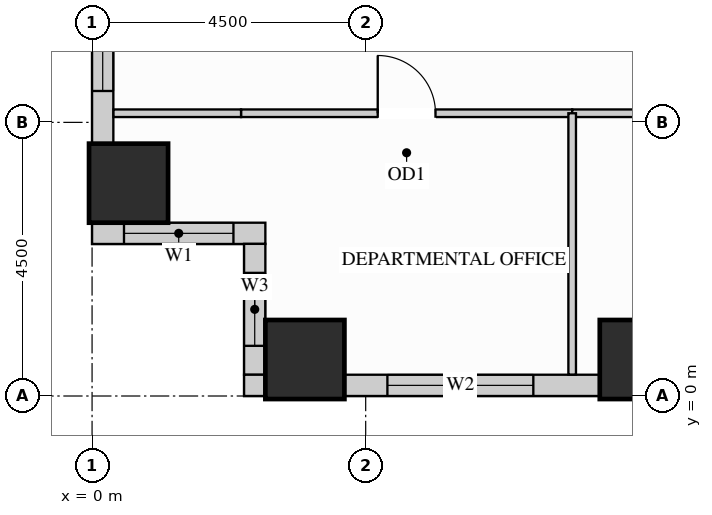
"""IFC4 building model, lengths in metres.
Left out: names, types, materials, properties, quantities, classifications, styles, units other than length and angle.
Written with IfcOpenShell. Run it as: python <this file> out.ifc"""

import sys

from ifc_helpers import new_model, si_unit, direction, frame, frame_2d, origin, origin_2d, place, context, subcontext, project, spatial, rectangle, extrude, source, transform, mapped, element, fill, save


model = new_model("IFC4")
c1 = context("Model", 3, precision=1e-05, world=origin(), true_north=direction((0.0, 1.0)))
c2 = subcontext(c1, "Body", "Model", "MODEL_VIEW")
j1 = project(units=[si_unit("LENGTHUNIT", "METRE"), si_unit("PLANEANGLEUNIT", "RADIAN")], contexts=[c1])
p1 = place(None, origin())
s1 = spatial("IfcSite", under=j1, at=p1, CompositionType="ELEMENT")
p2 = place(p1, origin())
s2 = spatial("IfcBuilding", under=s1, at=p2, CompositionType="ELEMENT")
p3 = place(p2, frame((0.0, 0.0, 22.5)))
s3 = spatial("IfcBuildingStorey", under=s2, at=p3, CompositionType="ELEMENT", Elevation=22.5)
m1 = source(origin(), c2, "Body", "SweptSolid", [
    extrude(rectangle(XDim=1.3, YDim=1.3, at=origin_2d()), origin(), (0.0, 0.0, 1.0), 3.38),
])
for number, where, z_axis, x_axis in (
    (1, (3.5, 0.6, 0.0), (0.0, 0.0, 1.0), (1.0, 0.0, 0.0)),
    (2, (9.0, 0.6, 0.0), (0.0, 0.0, 1.0), (1.0, 0.0, 0.0)),
    (3, (0.6, 3.5, 0.0), (0.0, 0.0, 1.0), (1.0, 0.0, 0.0)),
):
    element("IfcColumn", number, at=place(p3, frame(where, z_axis=z_axis, x_axis=x_axis)), inside=s3, PredefinedType="COLUMN", context=c2, shape_type="MappedRepresentation", body=[
        mapped(m1, transform((0.0, 0.0, 0.0), x_axis=(1.0, 0.0, 0.0), y_axis=(0.0, 1.0, 0.0), z_axis=(0.0, 0.0, 1.0))),
    ])
p4 = place(p3, frame((0.175, 7.852, 0.0), z_axis=(0.0, 0.0, 1.0), x_axis=(0.0, -1.0, 0.0)))
e4 = element("IfcWall", 4, at=p4, inside=s3, PredefinedType="SOLIDWALL", context=c2, shape_type="SweptSolid", body=[
    extrude(rectangle(XDim=3.704, YDim=0.35, at=frame_2d((1.852, 0.0))), origin(), (0.0, 0.0, 1.0), 2.51),
])
p5 = place(p4, frame((0.436, 0.0, 0.78)))
e5 = element("IfcOpeningElement", 5, at=p5, cuts=e4, PredefinedType="OPENING", context=c2, shape_type="SweptSolid", body=[
    extrude(rectangle(XDim=2.4, YDim=1.55, at=frame_2d((1.2, 0.775))), frame((0.0, 0.185, 0.0), z_axis=(0.0, -1.0, 0.0), x_axis=(1.0, 0.0, 0.0)), (0.0, 0.0, 1.0), 0.37),
])
p6 = place(p3, frame((0.0, 2.675, 0.0), z_axis=(0.0, 0.0, 1.0), x_axis=(1.0, 0.0, 0.0)))
e6 = element("IfcWall", 6, at=p6, inside=s3, PredefinedType="SOLIDWALL", context=c2, shape_type="SweptSolid", body=[
    extrude(rectangle(XDim=2.85, YDim=0.35, at=frame_2d((1.425, 0.0))), origin(), (0.0, 0.0, 1.0), 3.365),
])
p7 = place(p6, frame((0.525, 0.0, 0.78)))
e7 = element("IfcOpeningElement", 7, at=p7, cuts=e6, PredefinedType="OPENING", context=c2, shape_type="SweptSolid", body=[
    extrude(rectangle(XDim=1.8, YDim=2.1, at=frame_2d((0.9, 1.05))), frame((0.0, 0.185, 0.0), z_axis=(0.0, -1.0, 0.0), x_axis=(1.0, 0.0, 0.0)), (0.0, 0.0, 1.0), 0.37),
])
p8 = place(p3, frame((2.675, 2.502, 0.0), z_axis=(0.0, 0.0, 1.0), x_axis=(0.0, -1.0, 0.0)))
e8 = element("IfcWall", 8, at=p8, inside=s3, PredefinedType="SOLIDWALL", context=c2, shape_type="SweptSolid", body=[
    extrude(rectangle(XDim=2.154, YDim=0.35, at=frame_2d((1.077, 0.0))), origin(), (0.0, 0.0, 1.0), 3.365),
])
p9 = place(p8, frame((0.477, 0.0, 0.78)))
e9 = element("IfcOpeningElement", 9, at=p9, cuts=e8, PredefinedType="OPENING", context=c2, shape_type="SweptSolid", body=[
    extrude(rectangle(XDim=1.2, YDim=2.1, at=frame_2d((0.6, 1.05))), frame((0.0, 0.185, 0.0), z_axis=(0.0, -1.0, 0.0), x_axis=(1.0, 0.0, 0.0)), (0.0, 0.0, 1.0), 0.37),
])
m2 = source(origin(), c2, "Body", "SweptSolid", [
    extrude(rectangle(XDim=0.352, YDim=0.35, at=frame_2d((0.176, 0.0))), origin(), (0.0, 0.0, 1.0), 3.365),
])
p10 = place(p3, frame((2.5, 0.175, 0.0), z_axis=(0.0, 0.0, 1.0), x_axis=(1.0, 0.0, 0.0)))
e10 = element("IfcWall", 10, at=p10, inside=s3, PredefinedType="SOLIDWALL", context=c2, shape_type="MappedRepresentation", body=[
    mapped(m2, transform((0.0, 0.0, 0.0), x_axis=(1.0, 0.0, 0.0), y_axis=(0.0, 1.0, 0.0), z_axis=(0.0, 0.0, 1.0))),
])
p11 = place(p3, frame((4.148, 0.175, 0.0), z_axis=(0.0, 0.0, 1.0), x_axis=(1.0, 0.0, 0.0)))
e11 = element("IfcWall", 11, at=p11, inside=s3, PredefinedType="SOLIDWALL", context=c2, shape_type="SweptSolid", body=[
    extrude(rectangle(XDim=4.204, YDim=0.35, at=frame_2d((2.102, 0.0))), origin(), (0.0, 0.0, 1.0), 2.51),
])
p12 = place(p11, frame((0.709, 0.0, 0.78)))
e12 = element("IfcOpeningElement", 12, at=p12, cuts=e11, PredefinedType="OPENING", context=c2, shape_type="SweptSolid", body=[
    extrude(rectangle(XDim=2.4, YDim=1.55, at=frame_2d((1.2, 0.775))), frame((0.0, 0.185, 0.0), z_axis=(0.0, -1.0, 0.0), x_axis=(1.0, 0.0, 0.0)), (0.0, 0.0, 1.0), 0.37),
])
p13 = place(p3, frame((2.45, 4.65, 0.0), z_axis=(0.0, 0.0, 1.0), x_axis=(1.0, 0.0, 0.0)))
e13 = element("IfcWall", 13, at=p13, inside=s3, PredefinedType="PARTITIONING", context=c2, shape_type="SweptSolid", body=[
    extrude(rectangle(XDim=5.446, YDim=0.125, at=frame_2d((2.723, 0.0))), origin(), (0.0, 0.0, 1.0), 2.828),
])
p14 = place(p13, frame((2.248, 0.0, 0.0)))
e14 = element("IfcOpeningElement", 14, at=p14, cuts=e13, PredefinedType="OPENING", context=c2, shape_type="SweptSolid", body=[
    extrude(rectangle(XDim=0.95, YDim=2.15, at=frame_2d((0.475, 1.075))), frame((0.0, 0.073, 0.0), z_axis=(0.0, -1.0, 0.0), x_axis=(1.0, 0.0, 0.0)), (0.0, 0.0, 1.0), 0.145),
])
p15 = place(p3, frame((7.896, 4.65, 0.0), z_axis=(0.0, 0.0, 1.0), x_axis=(1.0, 0.0, 0.0)))
e15 = element("IfcWall", 15, at=p15, inside=s3, PredefinedType="PARTITIONING", context=c2, shape_type="SweptSolid", body=[
    extrude(rectangle(XDim=5.792, YDim=0.125, at=frame_2d((2.896, 0.0))), origin(), (0.0, 0.0, 1.0), 2.828),
])
p16 = place(p15, frame((2.421, 0.0, 0.0)))
e16 = element("IfcOpeningElement", 16, at=p16, cuts=e15, PredefinedType="OPENING", context=c2, shape_type="SweptSolid", body=[
    extrude(rectangle(XDim=0.95, YDim=2.15, at=frame_2d((0.475, 1.075))), frame((0.0, 0.073, 0.0), z_axis=(0.0, -1.0, 0.0), x_axis=(1.0, 0.0, 0.0)), (0.0, 0.0, 1.0), 0.145),
])
m3 = source(origin(), c2, "Body", "SweptSolid", [
    extrude(rectangle(XDim=2.098, YDim=0.125, at=frame_2d((1.049, 0.0))), origin(), (0.0, 0.0, 1.0), 2.828),
])
p17 = place(p3, frame((0.352, 4.65, 0.0), z_axis=(0.0, 0.0, 1.0), x_axis=(1.0, 0.0, 0.0)))
e17 = element("IfcWall", 17, at=p17, inside=s3, PredefinedType="PARTITIONING", context=c2, shape_type="MappedRepresentation", body=[
    mapped(m3, transform((0.0, 0.0, 0.0), x_axis=(1.0, 0.0, 0.0), y_axis=(0.0, 1.0, 0.0), z_axis=(0.0, 0.0, 1.0))),
])
m4 = source(origin(), c2, "Body", "SweptSolid", [
    extrude(rectangle(XDim=4.298, YDim=0.125, at=frame_2d((2.149, 0.0))), origin(), (0.0, 0.0, 1.0), 3.365),
])
p18 = place(p3, frame((7.896, 0.352, 0.0), z_axis=(0.0, 0.0, 1.0), x_axis=(0.0, 1.0, 0.0)))
e18 = element("IfcWall", 18, at=p18, inside=s3, PredefinedType="PARTITIONING", context=c2, shape_type="MappedRepresentation", body=[
    mapped(m4, transform((0.0, 0.0, 0.0), x_axis=(1.0, 0.0, 0.0), y_axis=(0.0, 1.0, 0.0), z_axis=(0.0, 0.0, 1.0))),
])
m5 = source(origin(), c2, "Body", "SweptSolid", [
    extrude(rectangle(XDim=0.95, YDim=2.15, at=frame_2d((0.475, 1.075))), frame((0.0, 0.025, 0.0), z_axis=(0.0, -1.0, 0.0), x_axis=(1.0, 0.0, 0.0)), (0.0, 0.0, 1.0), 0.05),
])
p19 = place(p14, origin())
e19 = element("IfcDoor", 19, at=p19, inside=s3, OperationType="SINGLE_SWING_LEFT", PredefinedType="DOOR", context=c2, shape_type="MappedRepresentation", body=[
    mapped(m5, transform((0.0, 0.0, 0.0), x_axis=(1.0, 0.0, 0.0), y_axis=(0.0, 1.0, 0.0), z_axis=(0.0, 0.0, 1.0))),
])
fill(e14, e19)
m6 = source(origin(), c2, "Body", "SweptSolid", [
    extrude(rectangle(XDim=1.8, YDim=2.1, at=frame_2d((0.9, 1.05))), frame((0.0, 0.03, 0.0), z_axis=(0.0, -1.0, 0.0), x_axis=(1.0, 0.0, 0.0)), (0.0, 0.0, 1.0), 0.06),
])
p20 = place(p7, origin())
e20 = element("IfcWindow", 20, at=p20, inside=s3, PartitioningType="SINGLE_PANEL", PredefinedType="WINDOW", context=c2, shape_type="MappedRepresentation", body=[
    mapped(m6, transform((0.0, 0.0, 0.0), x_axis=(1.0, 0.0, 0.0), y_axis=(0.0, 1.0, 0.0), z_axis=(0.0, 0.0, 1.0))),
])
fill(e7, e20)
m7 = source(origin(), c2, "Body", "SweptSolid", [
    extrude(rectangle(XDim=2.4, YDim=1.55, at=frame_2d((1.2, 0.775))), frame((0.0, 0.03, 0.0), z_axis=(0.0, -1.0, 0.0), x_axis=(1.0, 0.0, 0.0)), (0.0, 0.0, 1.0), 0.06),
])
p21 = place(p5, origin())
e21 = element("IfcWindow", 21, at=p21, inside=s3, PartitioningType="SINGLE_PANEL", PredefinedType="WINDOW", context=c2, shape_type="MappedRepresentation", body=[
    mapped(m7, transform((0.0, 0.0, 0.0), x_axis=(1.0, 0.0, 0.0), y_axis=(0.0, 1.0, 0.0), z_axis=(0.0, 0.0, 1.0))),
])
fill(e5, e21)
p22 = place(p12, origin())
e22 = element("IfcWindow", 22, at=p22, inside=s3, PartitioningType="SINGLE_PANEL", PredefinedType="WINDOW", context=c2, shape_type="MappedRepresentation", body=[
    mapped(m7, transform((0.0, 0.0, 0.0), x_axis=(1.0, 0.0, 0.0), y_axis=(0.0, 1.0, 0.0), z_axis=(0.0, 0.0, 1.0))),
])
fill(e12, e22)
m8 = source(origin(), c2, "Body", "SweptSolid", [
    extrude(rectangle(XDim=1.2, YDim=2.1, at=frame_2d((0.6, 1.05))), frame((0.0, 0.03, 0.0), z_axis=(0.0, -1.0, 0.0), x_axis=(1.0, 0.0, 0.0)), (0.0, 0.0, 1.0), 0.06),
])
p23 = place(p9, origin())
e23 = element("IfcWindow", 23, at=p23, inside=s3, PartitioningType="SINGLE_PANEL", PredefinedType="WINDOW", context=c2, shape_type="MappedRepresentation", body=[
    mapped(m8, transform((0.0, 0.0, 0.0), x_axis=(1.0, 0.0, 0.0), y_axis=(0.0, 1.0, 0.0), z_axis=(0.0, 0.0, 1.0))),
])
fill(e9, e23)
save(model, sys.argv[1])
